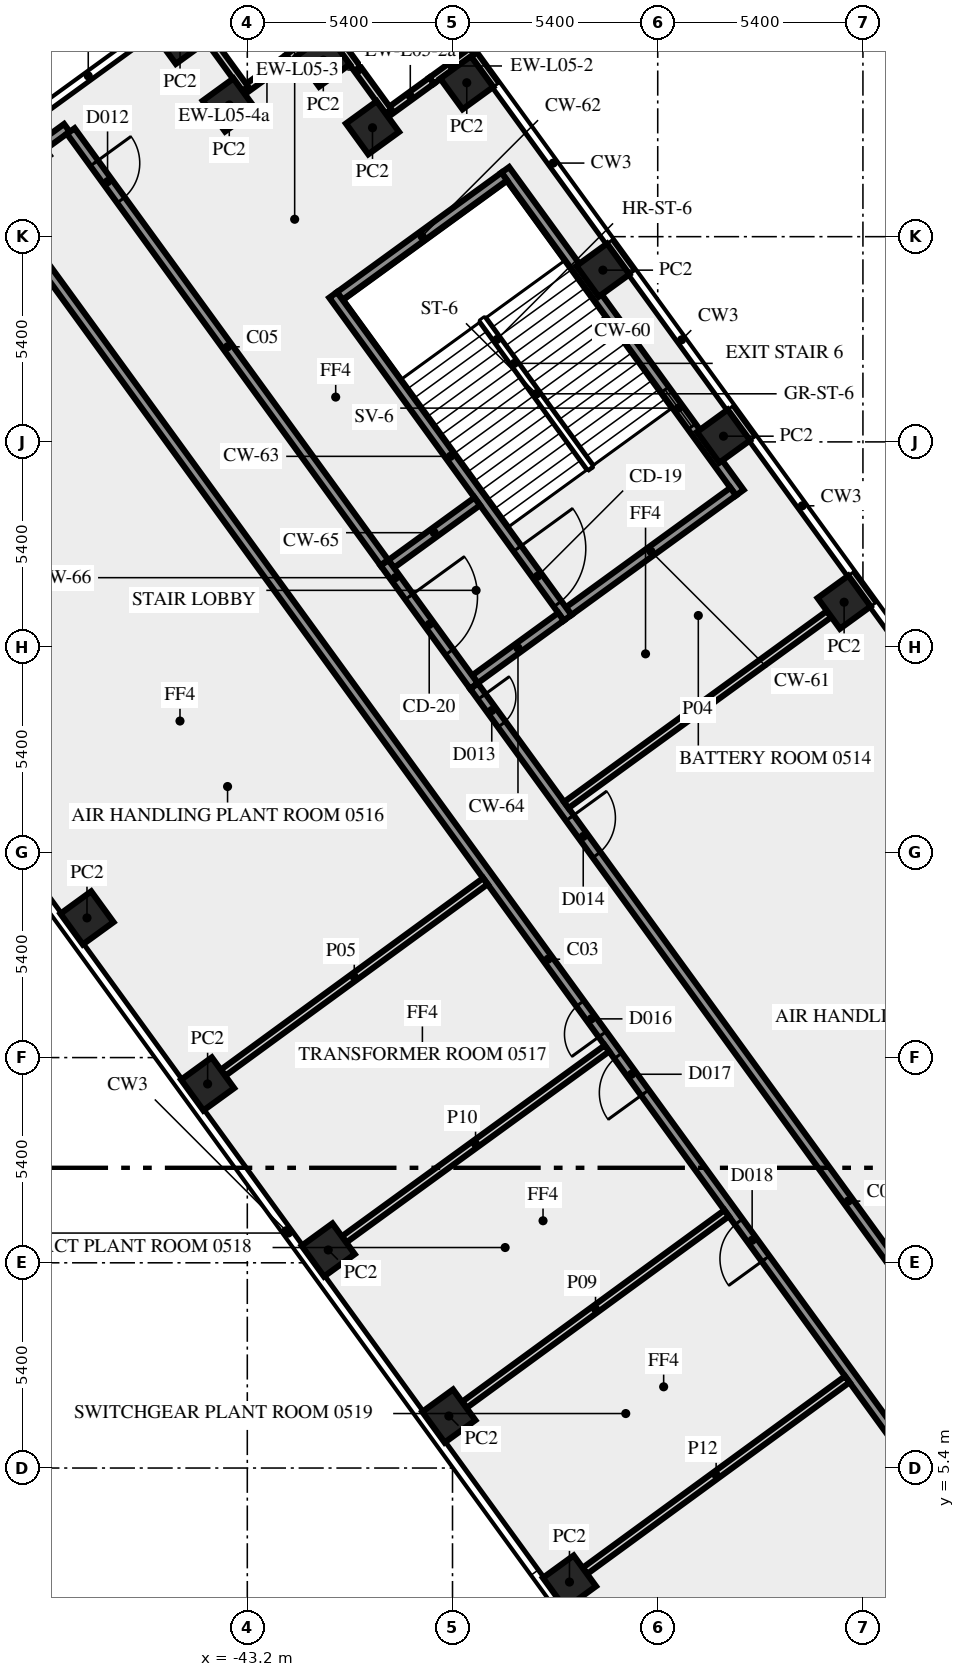
"""IFC4 building model, lengths in metres.
Left out: names, types, materials, properties, quantities, classifications, styles, units other than length and angle.
Written with IfcOpenShell. Run it as: python <this file> out.ifc"""

import sys

from ifc_helpers import new_model, si_unit, direction, frame, frame_2d, origin, origin_2d, place, context, subcontext, project, spatial, rectangle, extrude, element, fill, save


model = new_model("IFC4")
c1 = context("Model", 3, precision=1e-05, world=origin(), true_north=direction((0.0, 1.0)))
c2 = subcontext(c1, "Body", "Model", "MODEL_VIEW")
j1 = project(units=[si_unit("LENGTHUNIT", "METRE"), si_unit("PLANEANGLEUNIT", "RADIAN")], contexts=[c1])
p1 = place(None, origin())
s1 = spatial("IfcSite", under=j1, at=p1, CompositionType="ELEMENT")
p2 = place(p1, origin())
s2 = spatial("IfcBuilding", under=s1, at=p2, CompositionType="ELEMENT")
p3 = place(p2, frame((0.0, 0.0, 25.0)))
s3 = spatial("IfcBuildingStorey", under=s2, at=p3, CompositionType="ELEMENT", Elevation=25.0)
for number, where, z_axis, x_axis in (
    (1, (-27.495, 28.181, 0.0), (0.0, 0.0, 1.0), (-0.588, 0.809, 0.0)),
    (2, (-30.669, 32.55, 0.0), (0.0, 0.0, 1.0), (-0.588, 0.809, 0.0)),
    (3, (-33.843, 36.919, 0.0), (0.0, 0.0, 1.0), (-0.588, 0.809, 0.0)),
    (4, (-37.425, 41.85, 0.0), (0.0, 0.0, 1.0), (-0.588, 0.809, 0.0)),
    (5, (-39.906, 40.666, 0.0), (0.0, 0.0, 1.0), (-0.588, 0.809, 0.0)),
    (6, (-41.2, 42.445, 0.0), (0.0, 0.0, 1.0), (-0.588, 0.809, 0.0)),
    (7, (-43.675, 41.265, 0.0), (0.0, 0.0, 1.0), (-0.809, -0.588, 0.0)),
    (8, (-44.97, 43.045, 0.0), (0.0, 0.0, 1.0), (-0.809, -0.588, 0.0)),
    (9, (-47.418, 19.875, 0.0), (0.0, 0.0, 1.0), (0.588, -0.809, 0.0)),
    (10, (-44.244, 15.506, 0.0), (0.0, 0.0, 1.0), (0.588, -0.809, 0.0)),
    (11, (-41.07, 11.137, 0.0), (0.0, 0.0, 1.0), (0.588, -0.809, 0.0)),
    (12, (-37.896, 6.769, 0.0), (0.0, 0.0, 1.0), (0.588, -0.809, 0.0)),
    (13, (-34.722, 2.4, 0.0), (0.0, 0.0, 1.0), (0.588, -0.809, 0.0)),
):
    element("IfcColumn", number, at=place(p3, frame(where, z_axis=z_axis, x_axis=x_axis)), inside=s3, PredefinedType="COLUMN", context=c2, shape_type="SweptSolid", body=[
        extrude(rectangle(XDim=1.0, YDim=1.0, at=origin_2d()), origin(), (0.0, 0.0, 1.0), 5.65),
    ])
p4 = place(p3, frame((-14.354, 11.093, 0.0), z_axis=(0.0, 0.0, 1.0), x_axis=(-0.587787194805, 0.809015583054, 0.0)))
e14 = element("IfcWall", 14, at=p4, inside=s3, PredefinedType="SOLIDWALL", context=c2, shape_type="SweptSolid", body=[
    extrude(rectangle(XDim=39.044, YDim=0.2, at=frame_2d((19.522, 0.0))), origin(), (0.0, 0.0, 1.0), 5.65),
])
p5 = place(p3, frame((-37.287, 42.678, 0.0), z_axis=(0.0, 0.0, 1.0), x_axis=(-0.809065186597, -0.587718915671, 0.0)))
e15 = element("IfcWall", 15, at=p5, inside=s3, PredefinedType="SOLIDWALL", context=c2, shape_type="SweptSolid", body=[
    extrude(rectangle(XDim=1.315, YDim=0.2, at=frame_2d((0.657, 0.0))), origin(), (0.0, 0.0, 1.0), 5.65),
])
p6 = place(p3, frame((-38.351, 41.905, 0.0), z_axis=(0.0, 0.0, 1.0), x_axis=(-0.809002762913, -0.58780483972, 0.0)))
e16 = element("IfcWall", 16, at=p6, inside=s3, PredefinedType="SOLIDWALL", context=c2, shape_type="SweptSolid", body=[
    extrude(rectangle(XDim=1.385, YDim=0.2, at=frame_2d((0.693, 0.0))), origin(), (0.0, 0.0, 1.0), 4.15),
])
p7 = place(p3, frame((-39.488, 41.094, 0.0), z_axis=(0.0, 0.0, 1.0), x_axis=(-0.587806000234, 0.809001919707, 0.0)))
e17 = element("IfcWall", 17, at=p7, inside=s3, PredefinedType="SOLIDWALL", context=c2, shape_type="SweptSolid", body=[
    extrude(rectangle(XDim=2.7, YDim=0.2, at=frame_2d((1.35, 0.0))), origin(), (0.0, 0.0, 1.0), 5.65),
])
p8 = place(p3, frame((-41.058, 43.275, 0.0), z_axis=(0.0, 0.0, 1.0), x_axis=(-0.809056865039, -0.587730371117, 0.0)))
e18 = element("IfcWall", 18, at=p8, inside=s3, PredefinedType="SOLIDWALL", context=c2, shape_type="SweptSolid", body=[
    extrude(rectangle(XDim=1.316, YDim=0.2, at=frame_2d((0.658, 0.0))), origin(), (0.0, 0.0, 1.0), 5.65),
])
p9 = place(p3, frame((-42.123, 42.502, 0.0), z_axis=(0.0, 0.0, 1.0), x_axis=(-0.808926734208, -0.5879094647, 0.0)))
e19 = element("IfcWall", 19, at=p9, inside=s3, PredefinedType="SOLIDWALL", context=c2, shape_type="SweptSolid", body=[
    extrude(rectangle(XDim=1.384, YDim=0.2, at=frame_2d((0.692, 0.0))), origin(), (0.0, 0.0, 1.0), 4.15),
])
p10 = place(p3, frame((-43.259, 41.691, 0.0), z_axis=(0.0, 0.0, 1.0), x_axis=(-0.587822180636, 0.808990163075, 0.0)))
e20 = element("IfcWall", 20, at=p10, inside=s3, PredefinedType="SOLIDWALL", context=c2, shape_type="SweptSolid", body=[
    extrude(rectangle(XDim=2.7, YDim=0.2, at=frame_2d((1.35, 0.0))), origin(), (0.0, 0.0, 1.0), 5.65),
])
p11 = place(p3, frame((-44.83, 43.872, 0.0), z_axis=(0.0, 0.0, 1.0), x_axis=(-0.809023074878, -0.587776883106, 0.0)))
e21 = element("IfcWall", 21, at=p11, inside=s3, PredefinedType="SOLIDWALL", context=c2, shape_type="SweptSolid", body=[
    extrude(rectangle(XDim=11.4, YDim=0.2, at=frame_2d((5.7, 0.0))), origin(), (0.0, 0.0, 1.0), 5.65),
])
p12 = place(p3, frame((-55.244, 29.646, 0.0), z_axis=(0.0, 0.0, 1.0), x_axis=(0.587784449244, -0.809017577823, 0.0)))
e22 = element("IfcWall", 22, at=p12, inside=s3, PredefinedType="SOLIDWALL", context=c2, shape_type="SweptSolid", body=[
    extrude(rectangle(XDim=44.654, YDim=0.2, at=frame_2d((22.327, 0.0))), origin(), (0.0, 0.0, 1.0), 5.65),
])
p13 = place(p3, frame((-30.24, 31.064, 0.0), z_axis=(0.0, 0.0, 1.0), x_axis=(-0.587795589702, 0.809009483706, 0.0)))
e23 = element("IfcWall", 23, at=p13, inside=s3, PredefinedType="SHEAR", context=c2, shape_type="SweptSolid", body=[
    extrude(rectangle(XDim=10.5, YDim=0.25, at=frame_2d((5.25, 0.0))), origin(), (0.0, 0.0, 1.0), 5.65),
])
p14 = place(p13, frame((2.15, 0.0, 1.0)))
e24 = element("IfcOpeningElement", 24, at=p14, cuts=e23, PredefinedType="OPENING", context=c2, shape_type="SweptSolid", body=[
    extrude(rectangle(XDim=1.2, YDim=1.2, at=frame_2d((0.6, 0.6))), frame((0.0, 0.135, 0.0), z_axis=(0.0, -1.0, 0.0), x_axis=(1.0, 0.0, 0.0)), (0.0, 0.0, 1.0), 0.27),
])
p15 = place(p3, frame((-30.414, 31.092, 0.0), z_axis=(0.0, 0.0, 1.0), x_axis=(-0.8089984606, -0.587810760999, 0.0)))
e25 = element("IfcWall", 25, at=p15, inside=s3, PredefinedType="SHEAR", context=c2, shape_type="SweptSolid", body=[
    extrude(rectangle(XDim=5.35, YDim=0.25, at=frame_2d((2.675, 0.0))), origin(), (0.0, 0.0, 1.0), 5.65),
])
p16 = place(p3, frame((-36.439, 39.384, 0.0), z_axis=(0.0, 0.0, 1.0), x_axis=(-0.809020161303, -0.587780893365, 0.0)))
e26 = element("IfcWall", 26, at=p16, inside=s3, PredefinedType="SHEAR", context=c2, shape_type="SweptSolid", body=[
    extrude(rectangle(XDim=5.35, YDim=0.25, at=frame_2d((2.675, 0.0))), origin(), (0.0, 0.0, 1.0), 5.65),
])
p17 = place(p3, frame((-40.942, 36.267, 0.0), z_axis=(0.0, 0.0, 1.0), x_axis=(0.587795589702, -0.809009483706, 0.0)))
e27 = element("IfcWall", 27, at=p17, inside=s3, PredefinedType="SHEAR", context=c2, shape_type="SweptSolid", body=[
    extrude(rectangle(XDim=10.5, YDim=0.25, at=frame_2d((5.25, 0.0))), origin(), (0.0, 0.0, 1.0), 5.65),
])
p18 = place(p17, frame((8.25, 0.0, 0.0)))
e28 = element("IfcOpeningElement", 28, at=p18, cuts=e27, PredefinedType="OPENING", context=c2, shape_type="SweptSolid", body=[
    extrude(rectangle(XDim=1.8, YDim=2.1, at=frame_2d((0.9, 1.05))), frame((0.0, 0.135, 0.0), z_axis=(0.0, -1.0, 0.0), x_axis=(1.0, 0.0, 0.0)), (0.0, 0.0, 1.0), 0.27),
])
for number, where, z_axis, x_axis in (
    (29, (-34.945, 27.8, 0.0), (0.0, 0.0, 1.0), (-0.809, -0.588, 0.0)),
    (30, (-37.149, 30.834, 0.0), (0.0, 0.0, 1.0), (-0.809, -0.588, 0.0)),
):
    element("IfcWall", number, at=place(p3, frame(where, z_axis=z_axis, x_axis=x_axis)), inside=s3, PredefinedType="SHEAR", context=c2, shape_type="SweptSolid", body=[
        extrude(rectangle(XDim=2.8, YDim=0.25, at=frame_2d((1.4, 0.0))), origin(), (0.0, 0.0, 1.0), 5.65),
    ])
p19 = place(p3, frame((-39.589, 29.216, 0.0), z_axis=(0.0, 0.0, 1.0), x_axis=(0.587772420479, -0.809026317077, 0.0)))
e31 = element("IfcWall", 31, at=p19, inside=s3, PredefinedType="SHEAR", context=c2, shape_type="SweptSolid", body=[
    extrude(rectangle(XDim=4.0, YDim=0.25, at=frame_2d((2.0, 0.0))), origin(), (0.0, 0.0, 1.0), 5.65),
])
p20 = place(p19, frame((1.1, 0.0, 0.0)))
e32 = element("IfcOpeningElement", 32, at=p20, cuts=e31, PredefinedType="OPENING", context=c2, shape_type="SweptSolid", body=[
    extrude(rectangle(XDim=1.8, YDim=2.1, at=frame_2d((0.9, 1.05))), frame((0.0, 0.135, 0.0), z_axis=(0.0, -1.0, 0.0), x_axis=(1.0, 0.0, 0.0)), (0.0, 0.0, 1.0), 0.27),
])
p21 = place(p3, frame((-20.531, -1.523, 0.0), z_axis=(0.0, 0.0, 1.0), x_axis=(-0.587785385475, 0.809016897612, 0.0)))
e33 = element("IfcWall", 33, at=p21, inside=s3, PredefinedType="SOLIDWALL", context=c2, shape_type="SweptSolid", body=[
    extrude(rectangle(XDim=50.212, YDim=0.25, at=frame_2d((25.106, 0.0))), origin(), (0.0, 0.0, 1.0), 5.65),
])
p22 = place(p21, frame((47.87, 0.0, 0.0)))
e34 = element("IfcOpeningElement", 34, at=p22, cuts=e33, PredefinedType="OPENING", context=c2, shape_type="SweptSolid", body=[
    extrude(rectangle(XDim=1.2, YDim=2.1, at=frame_2d((0.6, 1.05))), frame((0.0, 0.135, 0.0), z_axis=(0.0, -1.0, 0.0), x_axis=(1.0, 0.0, 0.0)), (0.0, 0.0, 1.0), 0.27),
])
p23 = place(p21, frame((20.765, 0.0, 0.0)))
e35 = element("IfcOpeningElement", 35, at=p23, cuts=e33, PredefinedType="OPENING", context=c2, shape_type="SweptSolid", body=[
    extrude(rectangle(XDim=1.2, YDim=2.1, at=frame_2d((0.6, 1.05))), frame((0.0, 0.135, 0.0), z_axis=(0.0, -1.0, 0.0), x_axis=(1.0, 0.0, 0.0)), (0.0, 0.0, 1.0), 0.27),
])
p24 = place(p21, frame((15.366, 0.0, 0.0)))
e36 = element("IfcOpeningElement", 36, at=p24, cuts=e33, PredefinedType="OPENING", context=c2, shape_type="SweptSolid", body=[
    extrude(rectangle(XDim=1.2, YDim=2.1, at=frame_2d((0.6, 1.05))), frame((0.0, 0.135, 0.0), z_axis=(0.0, -1.0, 0.0), x_axis=(1.0, 0.0, 0.0)), (0.0, 0.0, 1.0), 0.27),
])
p25 = place(p21, frame((22.667, 0.0, 0.0)))
e37 = element("IfcOpeningElement", 37, at=p25, cuts=e33, PredefinedType="OPENING", context=c2, shape_type="SweptSolid", body=[
    extrude(rectangle(XDim=1.0, YDim=2.1, at=frame_2d((0.5, 1.05))), frame((0.0, 0.135, 0.0), z_axis=(0.0, -1.0, 0.0), x_axis=(1.0, 0.0, 0.0)), (0.0, 0.0, 1.0), 0.27),
])
p26 = place(p21, frame((0.533, 0.0, 0.0)))
e38 = element("IfcOpeningElement", 38, at=p26, cuts=e33, PredefinedType="OPENING", context=c2, shape_type="SweptSolid", body=[
    extrude(rectangle(XDim=1.0, YDim=2.1, at=frame_2d((0.5, 1.05))), frame((0.0, 0.135, 0.0), z_axis=(0.0, -1.0, 0.0), x_axis=(1.0, 0.0, 0.0)), (0.0, 0.0, 1.0), 0.27),
])
p27 = place(p3, frame((-49.96, 39.202, 0.0), z_axis=(0.0, 0.0, 1.0), x_axis=(0.809045768422, 0.587745646176, 0.0)))
e39 = element("IfcWall", 39, at=p27, inside=s3, PredefinedType="SOLIDWALL", context=c2, shape_type="SweptSolid", body=[
    extrude(rectangle(XDim=2.488, YDim=0.25, at=frame_2d((1.244, 0.0))), origin(), (0.0, 0.0, 1.0), 5.65),
])
p28 = place(p3, frame((-47.845, 40.58, 0.0), z_axis=(0.0, 0.0, 1.0), x_axis=(0.587788979369, -0.809014286482, 0.0)))
e40 = element("IfcWall", 40, at=p28, inside=s3, PredefinedType="SOLIDWALL", context=c2, shape_type="SweptSolid", body=[
    extrude(rectangle(XDim=14.036, YDim=0.25, at=frame_2d((7.018, 0.0))), origin(), (0.0, 0.0, 1.0), 5.65),
])
p29 = place(p28, frame((1.046, 0.0, 0.0)))
e41 = element("IfcOpeningElement", 41, at=p29, cuts=e40, PredefinedType="OPENING", context=c2, shape_type="SweptSolid", body=[
    extrude(rectangle(XDim=1.2, YDim=2.1, at=frame_2d((0.6, 1.05))), frame((0.0, 0.135, 0.0), z_axis=(0.0, -1.0, 0.0), x_axis=(1.0, 0.0, 0.0)), (0.0, 0.0, 1.0), 0.27),
])
p30 = place(p3, frame((-37.232, 25.972, 0.0), z_axis=(0.0, 0.0, 1.0), x_axis=(0.587786323093, -0.809016216391, 0.0)))
e42 = element("IfcWall", 42, at=p30, inside=s3, PredefinedType="SOLIDWALL", context=c2, shape_type="SweptSolid", body=[
    extrude(rectangle(XDim=33.493, YDim=0.25, at=frame_2d((16.747, 0.0))), origin(), (0.0, 0.0, 1.0), 5.65),
])
p31 = place(p30, frame((4.285, 0.0, 0.0)))
e43 = element("IfcOpeningElement", 43, at=p31, cuts=e42, PredefinedType="OPENING", context=c2, shape_type="SweptSolid", body=[
    extrude(rectangle(XDim=1.2, YDim=2.1, at=frame_2d((0.6, 1.05))), frame((0.0, 0.135, 0.0), z_axis=(0.0, -1.0, 0.0), x_axis=(1.0, 0.0, 0.0)), (0.0, 0.0, 1.0), 0.27),
])
p32 = place(p30, frame((0.34, 0.0, 0.0)))
e44 = element("IfcOpeningElement", 44, at=p32, cuts=e42, PredefinedType="OPENING", context=c2, shape_type="SweptSolid", body=[
    extrude(rectangle(XDim=0.9, YDim=2.1, at=frame_2d((0.45, 1.05))), frame((0.0, 0.135, 0.0), z_axis=(0.0, -1.0, 0.0), x_axis=(1.0, 0.0, 0.0)), (0.0, 0.0, 1.0), 0.27),
])
p33 = place(p3, frame((-27.892, 27.868, 0.0), z_axis=(0.0, 0.0, 1.0), x_axis=(-0.809008992571, -0.587796265673, 0.0)))
e45 = element("IfcWall", 45, at=p33, inside=s3, PredefinedType="SOLIDWALL", context=c2, shape_type="SweptSolid", body=[
    extrude(rectangle(XDim=8.547, YDim=0.2, at=frame_2d((4.273, 0.0))), origin(), (0.0, 0.0, 1.0), 5.65),
])
p34 = place(p3, frame((-43.835, 15.802, 0.0), z_axis=(0.0, 0.0, 1.0), x_axis=(0.807533485854, 0.589821726647, 0.0)))
e46 = element("IfcWall", 46, at=p34, inside=s3, PredefinedType="SOLIDWALL", context=c2, shape_type="SweptSolid", body=[
    extrude(rectangle(XDim=8.545, YDim=0.2, at=frame_2d((4.272, 0.0))), origin(), (0.0, 0.0, 1.0), 5.65),
])
p35 = place(p3, frame((-37.487, 7.064, 0.0), z_axis=(0.0, 0.0, 1.0), x_axis=(0.807513605299, 0.589848944441, 0.0)))
e47 = element("IfcWall", 47, at=p35, inside=s3, PredefinedType="SOLIDWALL", context=c2, shape_type="SweptSolid", body=[
    extrude(rectangle(XDim=8.545, YDim=0.2, at=frame_2d((4.272, 0.0))), origin(), (0.0, 0.0, 1.0), 5.65),
])
p36 = place(p3, frame((-33.737, 16.441, 0.0), z_axis=(0.0, 0.0, 1.0), x_axis=(-0.808967063133, -0.587853970614, 0.0)))
e48 = element("IfcWall", 48, at=p36, inside=s3, PredefinedType="SOLIDWALL", context=c2, shape_type="SweptSolid", body=[
    extrude(rectangle(XDim=8.545, YDim=0.2, at=frame_2d((4.272, 0.0))), origin(), (0.0, 0.0, 1.0), 5.65),
])
p37 = place(p3, frame((-34.313, 2.696, 0.0), z_axis=(0.0, 0.0, 1.0), x_axis=(0.80756437274, 0.589779436639, 0.0)))
e49 = element("IfcWall", 49, at=p37, inside=s3, PredefinedType="SOLIDWALL", context=c2, shape_type="SweptSolid", body=[
    extrude(rectangle(XDim=8.544, YDim=0.2, at=frame_2d((4.272, 0.0))), origin(), (0.0, 0.0, 1.0), 5.65),
])
p38 = place(p14, origin())
e50 = element("IfcWindow", 50, at=p38, inside=s3, PartitioningType="SINGLE_PANEL", PredefinedType="WINDOW", context=c2, shape_type="SweptSolid", body=[
    extrude(rectangle(XDim=1.2, YDim=1.2, at=frame_2d((0.6, 0.6))), frame((0.0, 0.03, 0.0), z_axis=(0.0, -1.0, 0.0), x_axis=(1.0, 0.0, 0.0)), (0.0, 0.0, 1.0), 0.06),
])
fill(e24, e50)
p39 = place(p18, origin())
e51 = element("IfcDoor", 51, at=p39, inside=s3, OperationType="DOUBLE_DOOR_SINGLE_SWING", PredefinedType="DOOR", context=c2, shape_type="SweptSolid", body=[
    extrude(rectangle(XDim=1.8, YDim=2.1, at=frame_2d((0.9, 1.05))), frame((0.0, 0.025, 0.0), z_axis=(0.0, -1.0, 0.0), x_axis=(1.0, 0.0, 0.0)), (0.0, 0.0, 1.0), 0.05),
])
fill(e28, e51)
p40 = place(p20, origin())
e52 = element("IfcDoor", 52, at=p40, inside=s3, OperationType="DOUBLE_DOOR_SINGLE_SWING", PredefinedType="DOOR", context=c2, shape_type="SweptSolid", body=[
    extrude(rectangle(XDim=1.8, YDim=2.1, at=frame_2d((0.9, 1.05))), frame((0.0, 0.025, 0.0), z_axis=(0.0, -1.0, 0.0), x_axis=(1.0, 0.0, 0.0)), (0.0, 0.0, 1.0), 0.05),
])
fill(e32, e52)
p41 = place(p31, origin())
e53 = element("IfcDoor", 53, at=p41, inside=s3, OperationType="SINGLE_SWING_LEFT", PredefinedType="DOOR", context=c2, shape_type="SweptSolid", body=[
    extrude(rectangle(XDim=1.2, YDim=2.1, at=frame_2d((0.6, 1.05))), frame((0.0, 0.025, 0.0), z_axis=(0.0, -1.0, 0.0), x_axis=(1.0, 0.0, 0.0)), (0.0, 0.0, 1.0), 0.05),
])
fill(e43, e53)
p42 = place(p29, origin())
e54 = element("IfcDoor", 54, at=p42, inside=s3, OperationType="SINGLE_SWING_LEFT", PredefinedType="DOOR", context=c2, shape_type="SweptSolid", body=[
    extrude(rectangle(XDim=1.2, YDim=2.1, at=frame_2d((0.6, 1.05))), frame((0.0, 0.025, 0.0), z_axis=(0.0, -1.0, 0.0), x_axis=(1.0, 0.0, 0.0)), (0.0, 0.0, 1.0), 0.05),
])
fill(e41, e54)
p43 = place(p23, origin())
e55 = element("IfcDoor", 55, at=p43, inside=s3, OperationType="SINGLE_SWING_RIGHT", PredefinedType="DOOR", context=c2, shape_type="SweptSolid", body=[
    extrude(rectangle(XDim=1.2, YDim=2.1, at=frame_2d((0.6, 1.05))), frame((0.0, 0.025, 0.0), z_axis=(0.0, -1.0, 0.0), x_axis=(1.0, 0.0, 0.0)), (0.0, 0.0, 1.0), 0.05),
])
fill(e35, e55)
p44 = place(p24, origin())
e56 = element("IfcDoor", 56, at=p44, inside=s3, OperationType="SINGLE_SWING_RIGHT", PredefinedType="DOOR", context=c2, shape_type="SweptSolid", body=[
    extrude(rectangle(XDim=1.2, YDim=2.1, at=frame_2d((0.6, 1.05))), frame((0.0, 0.025, 0.0), z_axis=(0.0, -1.0, 0.0), x_axis=(1.0, 0.0, 0.0)), (0.0, 0.0, 1.0), 0.05),
])
fill(e36, e56)
p45 = place(p25, origin())
e57 = element("IfcDoor", 57, at=p45, inside=s3, OperationType="SINGLE_SWING_LEFT", PredefinedType="DOOR", context=c2, shape_type="SweptSolid", body=[
    extrude(rectangle(XDim=1.0, YDim=2.1, at=frame_2d((0.5, 1.05))), frame((0.0, 0.025, 0.0), z_axis=(0.0, -1.0, 0.0), x_axis=(1.0, 0.0, 0.0)), (0.0, 0.0, 1.0), 0.05),
])
fill(e37, e57)
p46 = place(p32, origin())
e58 = element("IfcDoor", 58, at=p46, inside=s3, OperationType="SINGLE_SWING_LEFT", PredefinedType="DOOR", context=c2, shape_type="SweptSolid", body=[
    extrude(rectangle(XDim=0.9, YDim=2.1, at=frame_2d((0.45, 1.05))), frame((0.0, 0.025, 0.0), z_axis=(0.0, -1.0, 0.0), x_axis=(1.0, 0.0, 0.0)), (0.0, 0.0, 1.0), 0.05),
])
fill(e44, e58)
save(model, sys.argv[1])
